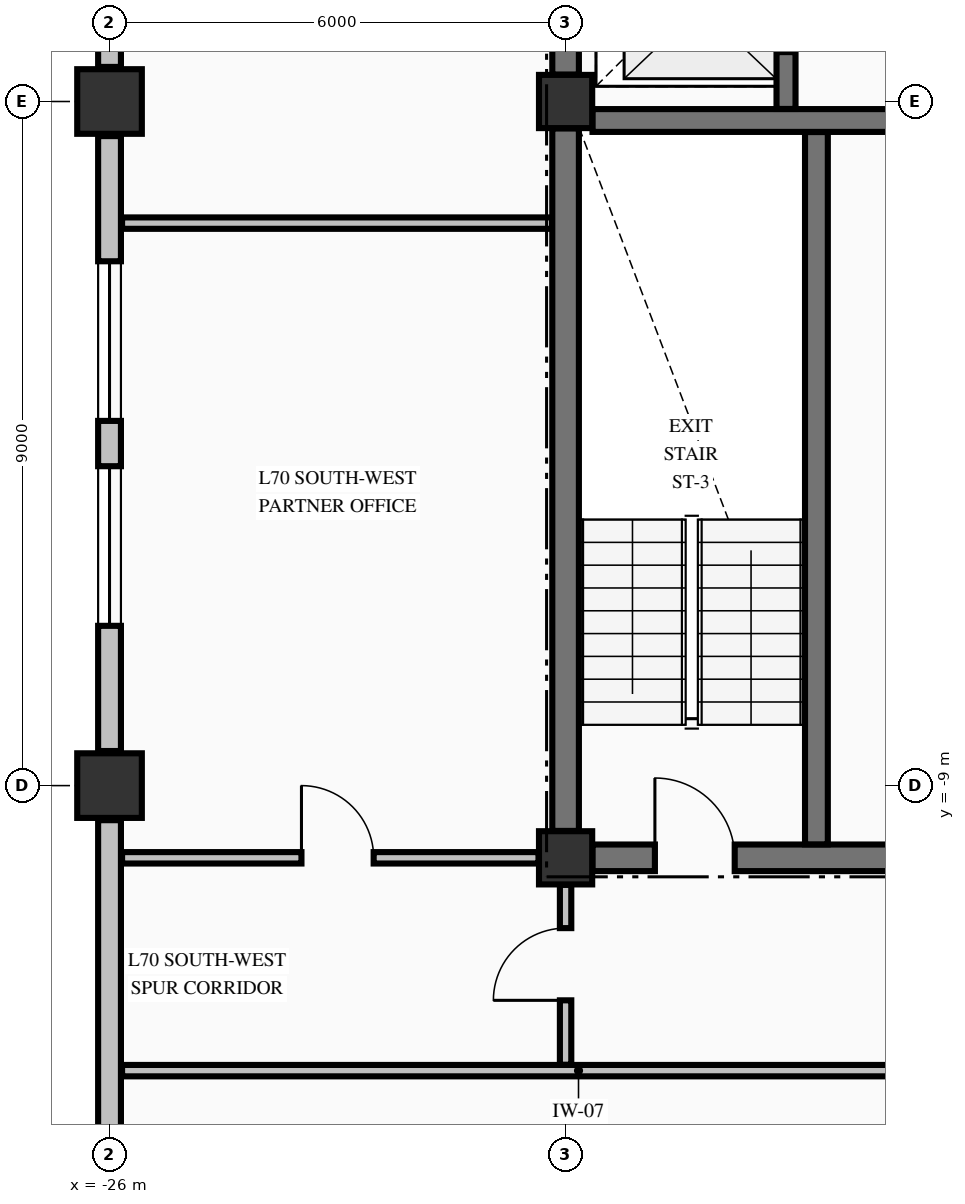
"""IFC4 building model, lengths in metres.
Left out: names, types, materials, properties, quantities, classifications, styles, units other than length and angle.
Written with IfcOpenShell. Run it as: python <this file> out.ifc"""

import sys

from ifc_helpers import new_model, si_unit, direction, frame, frame_2d, origin, origin_2d, place, context, subcontext, project, spatial, rectangle, extrude, element, fill, save


model = new_model("IFC4")
c1 = context("Model", 3, precision=1e-05, world=origin(), true_north=direction((0.0, 1.0)))
c2 = subcontext(c1, "Body", "Model", "MODEL_VIEW")
j1 = project(units=[si_unit("LENGTHUNIT", "METRE"), si_unit("PLANEANGLEUNIT", "RADIAN")], contexts=[c1])
p1 = place(None, origin())
s1 = spatial("IfcSite", under=j1, at=p1, CompositionType="ELEMENT")
p2 = place(p1, origin())
s2 = spatial("IfcBuilding", under=s1, at=p2, CompositionType="ELEMENT")
p3 = place(p2, frame((0.0, 0.0, 264.12)))
s3 = spatial("IfcBuildingStorey", under=s2, at=p3, CompositionType="ELEMENT", Elevation=264.12)
for number, where, z_axis, x_axis in (
    (1, (-26.0, -9.0, -0.25), (0.0, 0.0, 1.0), (1.0, 0.0, 0.0)),
    (2, (-26.0, 0.0, -0.25), (0.0, 0.0, 1.0), (1.0, 0.0, 0.0)),
):
    element("IfcColumn", number, at=place(p3, frame(where, z_axis=z_axis, x_axis=x_axis)), inside=s3, PredefinedType="COLUMN", context=c2, shape_type="SweptSolid", body=[
        extrude(rectangle(XDim=0.85, YDim=0.85, at=origin_2d()), origin(), (0.0, 0.0, 1.0), 3.23),
    ])
for number, where, z_axis, x_axis in (
    (3, (-20.0, -9.95, -0.25), (0.0, 0.0, 1.0), (1.0, 0.0, 0.0)),
    (4, (-20.0, 0.0, -0.25), (0.0, 0.0, 1.0), (1.0, 0.0, 0.0)),
):
    element("IfcColumn", number, at=place(p3, frame(where, z_axis=z_axis, x_axis=x_axis)), inside=s3, PredefinedType="COLUMN", context=c2, shape_type="SweptSolid", body=[
        extrude(rectangle(XDim=0.7, YDim=0.7, at=origin_2d()), origin(), (0.0, 0.0, 1.0), 3.23),
    ])
p4 = place(p3, frame((-26.0, -9.455, 0.0), z_axis=(0.0, 0.0, 1.0), x_axis=(0.0, -1.0, 0.0)))
e5 = element("IfcWall", 5, at=p4, inside=s3, PredefinedType="STANDARD", context=c2, shape_type="SweptSolid", body=[
    extrude(rectangle(XDim=8.09, YDim=0.3, at=frame_2d((4.045, 0.0))), origin(), (0.0, 0.0, 1.0), 2.372),
])
p5 = place(p3, frame((-26.0, -0.455, 0.0), z_axis=(0.0, 0.0, 1.0), x_axis=(0.0, -1.0, 0.0)))
e6 = element("IfcWall", 6, at=p5, inside=s3, PredefinedType="STANDARD", context=c2, shape_type="SweptSolid", body=[
    extrude(rectangle(XDim=8.09, YDim=0.3, at=frame_2d((4.045, 0.0))), origin(), (0.0, 0.0, 1.0), 2.372),
])
p6 = place(p5, frame((1.647, 0.0, 0.7)))
e7 = element("IfcOpeningElement", 7, at=p6, cuts=e6, PredefinedType="OPENING", context=c2, shape_type="SweptSolid", body=[
    extrude(rectangle(XDim=2.1, YDim=1.5, at=frame_2d((1.05, 0.75))), frame((0.0, 0.16, 0.0), z_axis=(0.0, -1.0, 0.0), x_axis=(1.0, 0.0, 0.0)), (0.0, 0.0, 1.0), 0.32),
])
p7 = place(p5, frame((4.343, 0.0, 0.7)))
e8 = element("IfcOpeningElement", 8, at=p7, cuts=e6, PredefinedType="OPENING", context=c2, shape_type="SweptSolid", body=[
    extrude(rectangle(XDim=2.1, YDim=1.5, at=frame_2d((1.05, 0.75))), frame((0.0, 0.16, 0.0), z_axis=(0.0, -1.0, 0.0), x_axis=(1.0, 0.0, 0.0)), (0.0, 0.0, 1.0), 0.32),
])
p8 = place(p3, frame((-26.0, 8.545, 0.0), z_axis=(0.0, 0.0, 1.0), x_axis=(0.0, -1.0, 0.0)))
e9 = element("IfcWall", 9, at=p8, inside=s3, PredefinedType="STANDARD", context=c2, shape_type="SweptSolid", body=[
    extrude(rectangle(XDim=8.09, YDim=0.3, at=frame_2d((4.045, 0.0))), origin(), (0.0, 0.0, 1.0), 2.372),
])
p9 = place(p8, frame((1.647, 0.0, 0.7)))
e10 = element("IfcOpeningElement", 10, at=p9, cuts=e9, PredefinedType="OPENING", context=c2, shape_type="SweptSolid", body=[
    extrude(rectangle(XDim=2.1, YDim=1.5, at=frame_2d((1.05, 0.75))), frame((0.0, 0.16, 0.0), z_axis=(0.0, -1.0, 0.0), x_axis=(1.0, 0.0, 0.0)), (0.0, 0.0, 1.0), 0.32),
])
p10 = place(p8, frame((4.343, 0.0, 0.7)))
e11 = element("IfcOpeningElement", 11, at=p10, cuts=e9, PredefinedType="OPENING", context=c2, shape_type="SweptSolid", body=[
    extrude(rectangle(XDim=2.1, YDim=1.5, at=frame_2d((1.05, 0.75))), frame((0.0, 0.16, 0.0), z_axis=(0.0, -1.0, 0.0), x_axis=(1.0, 0.0, 0.0)), (0.0, 0.0, 1.0), 0.32),
])
p11 = place(p3, frame((-19.646, -9.95, 0.0), z_axis=(0.0, 0.0, 1.0), x_axis=(1.0, 0.0, 0.0)))
e12 = element("IfcWall", 12, at=p11, inside=s3, PredefinedType="SHEAR", context=c2, shape_type="SweptSolid", body=[
    extrude(rectangle(XDim=4.946, YDim=0.35, at=frame_2d((2.473, 0.0))), origin(), (0.0, 0.0, 1.0), 2.98),
])
p12 = place(p11, frame((0.821, 0.0, 0.0)))
e13 = element("IfcOpeningElement", 13, at=p12, cuts=e12, PredefinedType="OPENING", context=c2, shape_type="SweptSolid", body=[
    extrude(rectangle(XDim=1.05, YDim=2.15, at=frame_2d((0.525, 1.075))), frame((0.0, 0.185, 0.0), z_axis=(0.0, -1.0, 0.0), x_axis=(1.0, 0.0, 0.0)), (0.0, 0.0, 1.0), 0.37),
])
p13 = place(p3, frame((-19.646, -0.25, 0.0), z_axis=(0.0, 0.0, 1.0), x_axis=(1.0, 0.0, 0.0)))
e14 = element("IfcWall", 14, at=p13, inside=s3, PredefinedType="SHEAR", context=c2, shape_type="SweptSolid", body=[
    extrude(rectangle(XDim=8.292, YDim=0.3, at=frame_2d((4.146, 0.0))), origin(), (0.0, 0.0, 1.0), 2.98),
])
p14 = place(p13, frame((5.946, 0.0, 0.0)))
e15 = element("IfcOpeningElement", 15, at=p14, cuts=e14, PredefinedType="OPENING", context=c2, shape_type="SweptSolid", body=[
    extrude(rectangle(XDim=1.1, YDim=2.15, at=frame_2d((0.55, 1.075))), frame((0.0, 0.16, 0.0), z_axis=(0.0, -1.0, 0.0), x_axis=(1.0, 0.0, 0.0)), (0.0, 0.0, 1.0), 0.32),
])
p15 = place(p3, frame((-25.835, -12.75, 0.0), z_axis=(0.0, 0.0, 1.0), x_axis=(1.0, 0.0, 0.0)))
e16 = element("IfcWall", 16, at=p15, inside=s3, PredefinedType="PARTITIONING", context=c2, shape_type="SweptSolid", body=[
    extrude(rectangle(XDim=45.91, YDim=0.15, at=frame_2d((22.955, 0.0))), origin(), (0.0, 0.0, 1.0), 2.98),
])
p16 = place(p15, frame((12.01, 0.0, 0.0)))
e17 = element("IfcOpeningElement", 17, at=p16, cuts=e16, PredefinedType="OPENING", context=c2, shape_type="SweptSolid", body=[
    extrude(rectangle(XDim=1.05, YDim=2.15, at=frame_2d((0.525, 1.075))), frame((0.0, 0.085, 0.0), z_axis=(0.0, -1.0, 0.0), x_axis=(1.0, 0.0, 0.0)), (0.0, 0.0, 1.0), 0.17),
])
p17 = place(p15, frame((23.11, 0.0, 0.0)))
e18 = element("IfcOpeningElement", 18, at=p17, cuts=e16, PredefinedType="OPENING", context=c2, shape_type="SweptSolid", body=[
    extrude(rectangle(XDim=1.05, YDim=2.15, at=frame_2d((0.525, 1.075))), frame((0.0, 0.085, 0.0), z_axis=(0.0, -1.0, 0.0), x_axis=(1.0, 0.0, 0.0)), (0.0, 0.0, 1.0), 0.17),
])
p18 = place(p15, frame((34.26, 0.0, 0.0)))
e19 = element("IfcOpeningElement", 19, at=p18, cuts=e16, PredefinedType="OPENING", context=c2, shape_type="SweptSolid", body=[
    extrude(rectangle(XDim=1.05, YDim=2.15, at=frame_2d((0.525, 1.075))), frame((0.0, 0.085, 0.0), z_axis=(0.0, -1.0, 0.0), x_axis=(1.0, 0.0, 0.0)), (0.0, 0.0, 1.0), 0.17),
])
p19 = place(p3, frame((-25.835, -9.95, 0.0), z_axis=(0.0, 0.0, 1.0), x_axis=(1.0, 0.0, 0.0)))
e20 = element("IfcWall", 20, at=p19, inside=s3, PredefinedType="PARTITIONING", context=c2, shape_type="SweptSolid", body=[
    extrude(rectangle(XDim=5.479, YDim=0.15, at=frame_2d((2.74, 0.0))), origin(), (0.0, 0.0, 1.0), 2.98),
])
p20 = place(p19, frame((2.36, 0.0, 0.0)))
e21 = element("IfcOpeningElement", 21, at=p20, cuts=e20, PredefinedType="OPENING", context=c2, shape_type="SweptSolid", body=[
    extrude(rectangle(XDim=0.95, YDim=2.15, at=frame_2d((0.475, 1.075))), frame((0.0, 0.085, 0.0), z_axis=(0.0, -1.0, 0.0), x_axis=(1.0, 0.0, 0.0)), (0.0, 0.0, 1.0), 0.17),
])
p21 = place(p3, frame((-25.835, -1.6, 0.0), z_axis=(0.0, 0.0, 1.0), x_axis=(1.0, 0.0, 0.0)))
e22 = element("IfcWall", 22, at=p21, inside=s3, PredefinedType="PARTITIONING", context=c2, shape_type="SweptSolid", body=[
    extrude(rectangle(XDim=5.657, YDim=0.15, at=frame_2d((2.829, 0.0))), origin(), (0.0, 0.0, 1.0), 2.98),
])
p22 = place(p3, frame((-20.0, -9.596, 0.0), z_axis=(0.0, 0.0, 1.0), x_axis=(0.0, 1.0, 0.0)))
e23 = element("IfcWall", 23, at=p22, inside=s3, PredefinedType="SHEAR", context=c2, shape_type="SweptSolid", body=[
    extrude(rectangle(XDim=9.242, YDim=0.35, at=frame_2d((4.621, 0.0))), origin(), (0.0, 0.0, 1.0), 2.98),
])
p23 = place(p3, frame((-20.0, 0.354, 0.0), z_axis=(0.0, 0.0, 1.0), x_axis=(0.0, 1.0, 0.0)))
e24 = element("IfcWall", 24, at=p23, inside=s3, PredefinedType="SHEAR", context=c2, shape_type="SweptSolid", body=[
    extrude(rectangle(XDim=2.169, YDim=0.35, at=frame_2d((1.084, 0.0))), origin(), (0.0, 0.0, 1.0), 2.98),
])
p24 = place(p3, frame((-17.1, -0.098, 0.0), z_axis=(0.0, 0.0, 1.0), x_axis=(0.0, 1.0, 0.0)))
e25 = element("IfcWall", 25, at=p24, inside=s3, PredefinedType="SOLIDWALL", context=c2, shape_type="SweptSolid", body=[
    extrude(rectangle(XDim=2.621, YDim=0.25, at=frame_2d((1.311, 0.0))), origin(), (0.0, 0.0, 1.0), 2.98),
])
p25 = place(p24, frame((0.748, 0.0, 0.0)))
e26 = element("IfcOpeningElement", 26, at=p25, cuts=e25, PredefinedType="OPENING", context=c2, shape_type="SweptSolid", body=[
    extrude(rectangle(XDim=1.1, YDim=2.2, at=frame_2d((0.55, 1.1))), frame((0.0, 0.135, 0.0), z_axis=(0.0, -1.0, 0.0), x_axis=(1.0, 0.0, 0.0)), (0.0, 0.0, 1.0), 0.27),
])
p26 = place(p3, frame((-16.7, -9.773, 0.0), z_axis=(0.0, 0.0, 1.0), x_axis=(0.0, 1.0, 0.0)))
e27 = element("IfcWall", 27, at=p26, inside=s3, PredefinedType="SHEAR", context=c2, shape_type="SweptSolid", body=[
    extrude(rectangle(XDim=9.371, YDim=0.3, at=frame_2d((4.686, 0.0))), origin(), (0.0, 0.0, 1.0), 2.98),
])
p27 = place(p3, frame((-20.0, -12.672, 0.0), z_axis=(0.0, 0.0, 1.0), x_axis=(0.0, 1.0, 0.0)))
e28 = element("IfcWall", 28, at=p27, inside=s3, PredefinedType="PARTITIONING", context=c2, shape_type="SweptSolid", body=[
    extrude(rectangle(XDim=2.366, YDim=0.15, at=frame_2d((1.183, 0.0))), origin(), (0.0, 0.0, 1.0), 2.98),
])
p28 = place(p27, frame((0.847, 0.0, 0.0)))
e29 = element("IfcOpeningElement", 29, at=p28, cuts=e28, PredefinedType="OPENING", context=c2, shape_type="SweptSolid", body=[
    extrude(rectangle(XDim=0.95, YDim=2.15, at=frame_2d((0.475, 1.075))), frame((0.0, 0.085, 0.0), z_axis=(0.0, -1.0, 0.0), x_axis=(1.0, 0.0, 0.0)), (0.0, 0.0, 1.0), 0.17),
])
p29 = place(p6, origin())
e30 = element("IfcWindow", 30, at=p29, inside=s3, PartitioningType="SINGLE_PANEL", PredefinedType="WINDOW", context=c2, shape_type="SweptSolid", body=[
    extrude(rectangle(XDim=2.1, YDim=1.5, at=frame_2d((1.05, 0.75))), frame((0.0, 0.03, 0.0), z_axis=(0.0, -1.0, 0.0), x_axis=(1.0, 0.0, 0.0)), (0.0, 0.0, 1.0), 0.06),
])
fill(e7, e30)
p30 = place(p7, origin())
e31 = element("IfcWindow", 31, at=p30, inside=s3, PartitioningType="SINGLE_PANEL", PredefinedType="WINDOW", context=c2, shape_type="SweptSolid", body=[
    extrude(rectangle(XDim=2.1, YDim=1.5, at=frame_2d((1.05, 0.75))), frame((0.0, 0.03, 0.0), z_axis=(0.0, -1.0, 0.0), x_axis=(1.0, 0.0, 0.0)), (0.0, 0.0, 1.0), 0.06),
])
fill(e8, e31)
p31 = place(p12, origin())
e32 = element("IfcDoor", 32, at=p31, inside=s3, OperationType="SINGLE_SWING_LEFT", PredefinedType="DOOR", context=c2, shape_type="SweptSolid", body=[
    extrude(rectangle(XDim=1.05, YDim=2.15, at=frame_2d((0.525, 1.075))), frame((0.0, 0.025, 0.0), z_axis=(0.0, -1.0, 0.0), x_axis=(1.0, 0.0, 0.0)), (0.0, 0.0, 1.0), 0.05),
])
fill(e13, e32)
p32 = place(p28, origin())
e33 = element("IfcDoor", 33, at=p32, inside=s3, OperationType="SINGLE_SWING_LEFT", PredefinedType="DOOR", context=c2, shape_type="SweptSolid", body=[
    extrude(rectangle(XDim=0.95, YDim=2.15, at=frame_2d((0.475, 1.075))), frame((0.0, 0.025, 0.0), z_axis=(0.0, -1.0, 0.0), x_axis=(1.0, 0.0, 0.0)), (0.0, 0.0, 1.0), 0.05),
])
fill(e29, e33)
p33 = place(p20, origin())
e34 = element("IfcDoor", 34, at=p33, inside=s3, OperationType="SINGLE_SWING_LEFT", PredefinedType="DOOR", context=c2, shape_type="SweptSolid", body=[
    extrude(rectangle(XDim=0.95, YDim=2.15, at=frame_2d((0.475, 1.075))), frame((0.0, 0.025, 0.0), z_axis=(0.0, -1.0, 0.0), x_axis=(1.0, 0.0, 0.0)), (0.0, 0.0, 1.0), 0.05),
])
fill(e21, e34)
save(model, sys.argv[1])
